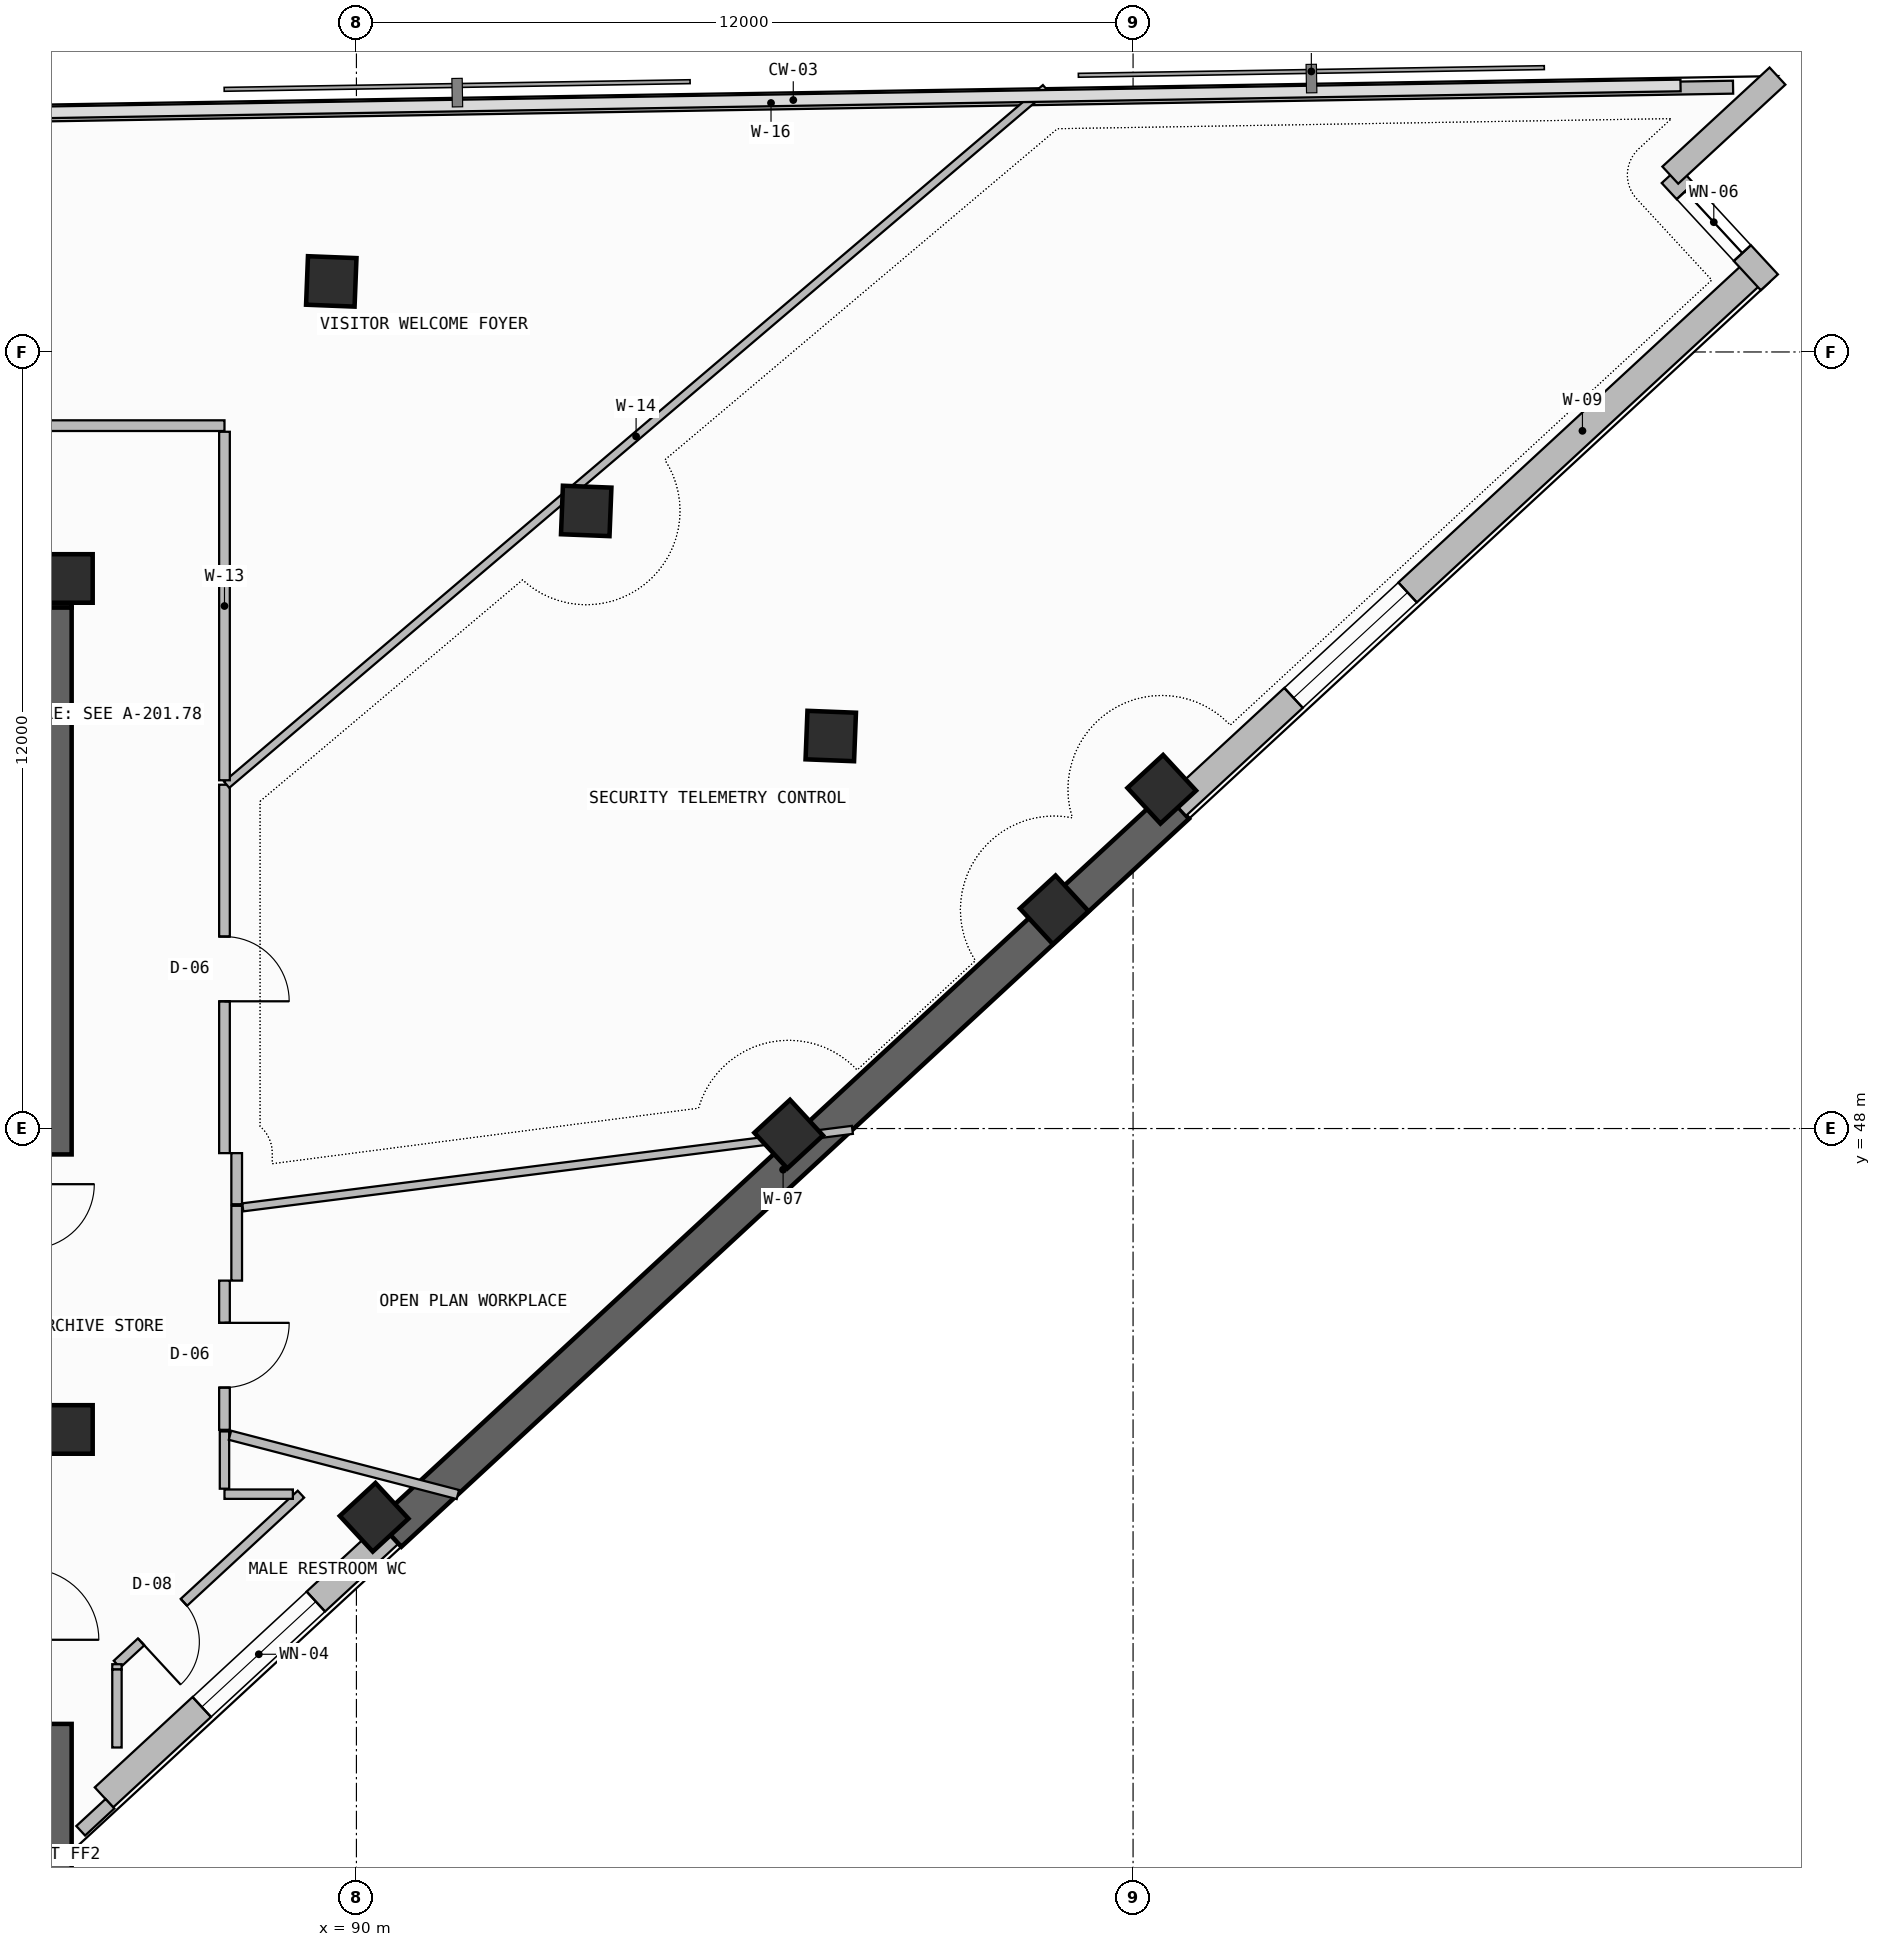
"""IFC4 building model, lengths in metres.
Left out: names, types, materials, properties, quantities, classifications, styles, units other than length and angle.
Written with IfcOpenShell. Run it as: python <this file> out.ifc"""

import sys

from ifc_helpers import new_model, si_unit, direction, frame, frame_2d, origin, origin_2d, place, context, subcontext, project, spatial, rectangle, extrude, element, fill, save


model = new_model("IFC4")
c1 = context("Model", 3, precision=1e-05, world=origin(), true_north=direction((0.0, 1.0)))
c2 = subcontext(c1, "Body", "Model", "MODEL_VIEW")
j1 = project(units=[si_unit("LENGTHUNIT", "METRE"), si_unit("PLANEANGLEUNIT", "RADIAN")], contexts=[c1])
p1 = place(None, origin())
s1 = spatial("IfcSite", under=j1, at=p1, CompositionType="ELEMENT")
p2 = place(p1, origin())
s2 = spatial("IfcBuilding", under=s1, at=p2, CompositionType="ELEMENT")
p3 = place(p2, frame((0.0, 0.0, 278.34)))
s3 = spatial("IfcBuildingStorey", under=s2, at=p3, CompositionType="ELEMENT", Elevation=278.34)
p4 = place(p3, frame((85.3, 35.5, -0.26), z_axis=(0.0, 0.0, 1.0), x_axis=(0.0, 1.0, 0.0)))
e1 = element("IfcWall", 1, at=p4, inside=s3, PredefinedType="SHEAR", context=c2, shape_type="SweptSolid", body=[
    extrude(rectangle(XDim=3.3, YDim=0.6, at=frame_2d((1.65, 0.0))), origin(), (0.0, 0.0, 1.0), 3.52),
])
p5 = place(p3, frame((72.0, 56.35, -0.26), z_axis=(0.0, 0.0, 1.0), x_axis=(1.0, 0.0, 0.0)))
e2 = element("IfcWall", 2, at=p5, inside=s3, PredefinedType="SHEAR", context=c2, shape_type="SweptSolid", body=[
    extrude(rectangle(XDim=13.6, YDim=0.6, at=frame_2d((6.8, 0.0))), origin(), (0.0, 0.0, 1.0), 3.52),
])
p6 = place(p3, frame((85.3, 47.6, -0.26), z_axis=(0.0, 0.0, 1.0), x_axis=(0.0, 1.0, 0.0)))
e3 = element("IfcWall", 3, at=p6, inside=s3, PredefinedType="SHEAR", context=c2, shape_type="SweptSolid", body=[
    extrude(rectangle(XDim=8.45, YDim=0.6, at=frame_2d((4.225, 0.0))), origin(), (0.0, 0.0, 1.0), 3.52),
])
for number, where, z_axis, x_axis in (
    (4, (85.55, 43.35, 0.0), (0.0, 0.0, 1.0), (1.0, 0.0, 0.0)),
    (5, (85.55, 56.5, 0.0), (0.0, 0.0, 1.0), (1.0, 0.0, 0.0)),
    (6, (90.273, 41.993, 0.0), (0.0, 0.0, 1.0), (0.734, 0.679, 0.0)),
    (7, (96.679, 47.914, 0.0), (0.0, 0.0, 1.0), (0.734, 0.679, 0.0)),
    (8, (102.443, 53.242, 0.0), (0.0, 0.0, 1.0), (0.734, 0.679, 0.0)),
    (9, (100.782, 51.38, 0.0), (0.0, 0.0, 1.0), (0.734, 0.679, 0.0)),
    (10, (97.329, 54.065, 0.0), (0.0, 0.0, 1.0), (0.039, 0.999, 0.0)),
    (11, (93.55, 57.544, 0.0), (0.0, 0.0, 1.0), (0.039, 0.999, 0.0)),
    (12, (89.611, 61.09, 0.0), (0.0, 0.0, 1.0), (0.039, 0.999, 0.0)),
):
    element("IfcColumn", number, at=place(p3, frame(where, z_axis=z_axis, x_axis=x_axis)), inside=s3, PredefinedType="COLUMN", context=c2, shape_type="SweptSolid", body=[
        extrude(rectangle(XDim=0.75, YDim=0.75, at=origin_2d()), origin(), (0.0, 0.0, 1.0), 3.52),
    ])
p7 = place(p3, frame((86.1, 37.665, 0.0), z_axis=(0.0, 0.0, 1.0), x_axis=(0.734321413343, 0.678801931277, 0.0)))
e13 = element("IfcWall", 13, at=p7, inside=s3, PredefinedType="SOLIDWALL", context=c2, shape_type="SweptSolid", body=[
    extrude(rectangle(XDim=6.002, YDim=0.42, at=frame_2d((3.001, 0.0))), origin(), (0.0, 0.0, 1.0), 2.245),
])
p8 = place(p7, frame((2.057, 0.0, 0.965)))
e14 = element("IfcOpeningElement", 14, at=p8, cuts=e13, PredefinedType="OPENING", context=c2, shape_type="SweptSolid", body=[
    extrude(rectangle(XDim=2.4, YDim=1.2, at=frame_2d((1.2, 0.6))), frame((0.0, 0.22, 0.0), z_axis=(0.0, -1.0, 0.0), x_axis=(1.0, 0.0, 0.0)), (0.0, 0.0, 1.0), 0.44),
])
p9 = place(p3, frame((90.508, 41.74, -0.26), z_axis=(0.0, 0.0, 1.0), x_axis=(0.734315848115, 0.678807951638, 0.0)))
e15 = element("IfcWall", 15, at=p9, inside=s3, PredefinedType="SHEAR", context=c2, shape_type="SweptSolid", body=[
    extrude(rectangle(XDim=16.573, YDim=0.55, at=frame_2d((8.286, 0.0))), origin(), (0.0, 0.0, 1.0), 3.52),
])
p10 = place(p3, frame((102.677, 52.989, 0.0), z_axis=(0.0, 0.0, 1.0), x_axis=(0.734331107219, 0.678791444386, 0.0)))
e16 = element("IfcWall", 16, at=p10, inside=s3, PredefinedType="SOLIDWALL", context=c2, shape_type="SweptSolid", body=[
    extrude(rectangle(XDim=12.211, YDim=0.42, at=frame_2d((6.106, 0.0))), origin(), (0.0, 0.0, 1.0), 2.245),
])
p11 = place(p10, frame((2.454, 0.0, 0.965)))
e17 = element("IfcOpeningElement", 17, at=p11, cuts=e16, PredefinedType="OPENING", context=c2, shape_type="SweptSolid", body=[
    extrude(rectangle(XDim=2.4, YDim=1.2, at=frame_2d((1.2, 0.6))), frame((0.0, 0.22, 0.0), z_axis=(0.0, -1.0, 0.0), x_axis=(1.0, 0.0, 0.0)), (0.0, 0.0, 1.0), 0.44),
])
p12 = place(p3, frame((111.832, 61.076, 0.0), z_axis=(0.0, 0.0, 1.0), x_axis=(-0.678792531533, 0.734330102294, 0.0)))
e18 = element("IfcWall", 18, at=p12, inside=s3, PredefinedType="SOLIDWALL", context=c2, shape_type="SweptSolid", body=[
    extrude(rectangle(XDim=2.255, YDim=0.36, at=frame_2d((1.127, 0.0))), origin(), (0.0, 0.0, 1.0), 3.26),
])
p13 = place(p12, frame((0.615, 0.0, 0.45)))
e19 = element("IfcOpeningElement", 19, at=p13, cuts=e18, PredefinedType="OPENING", context=c2, shape_type="SweptSolid", body=[
    extrude(rectangle(XDim=1.3, YDim=2.4, at=frame_2d((0.65, 1.2))), frame((0.0, 0.19, 0.0), z_axis=(0.0, -1.0, 0.0), x_axis=(1.0, 0.0, 0.0)), (0.0, 0.0, 1.0), 0.38),
])
p14 = place(p3, frame((110.301, 62.732, 0.0), z_axis=(0.0, 0.0, 1.0), x_axis=(0.734330102294, 0.678792531533, 0.0)))
e20 = element("IfcWall", 20, at=p14, inside=s3, PredefinedType="SOLIDWALL", context=c2, shape_type="SweptSolid", body=[
    extrude(rectangle(XDim=2.255, YDim=0.36, at=frame_2d((1.127, 0.0))), origin(), (0.0, 0.0, 1.0), 3.26),
])
p15 = place(p3, frame((111.271, 64.092, 0.0), z_axis=(0.0, 0.0, 1.0), x_axis=(-0.999864741935, -0.016446818413, 0.0)))
e21 = element("IfcWall", 21, at=p15, inside=s3, PredefinedType="PARAPET", context=c2, shape_type="SweptSolid", body=[
    extrude(rectangle(XDim=29.733, YDim=0.2, at=frame_2d((14.866, 0.0))), origin(), (0.0, 0.0, 1.0), 1.15),
])
p16 = place(p3, frame((86.192, 37.566, 0.0), z_axis=(0.0, 0.0, 1.0), x_axis=(-0.734346728958, -0.678774544064, 0.0)))
e22 = element("IfcWall", 22, at=p16, inside=s3, PredefinedType="PARAPET", context=c2, shape_type="SweptSolid", body=[
    extrude(rectangle(XDim=0.615, YDim=0.2, at=frame_2d((0.308, 0.0))), origin(), (0.0, 0.0, 1.0), 1.15),
])
p17 = place(p3, frame((86.3, 39.722, 0.0), z_axis=(0.0, 0.0, 1.0), x_axis=(0.734312402088, 0.678811679436, 0.0)))
e23 = element("IfcWall", 23, at=p17, inside=s3, PredefinedType="PARTITIONING", context=c2, shape_type="SweptSolid", body=[
    extrude(rectangle(XDim=3.871, YDim=0.145, at=frame_2d((1.936, 0.0))), origin(), (0.0, 0.0, 1.0), 2.745),
])
p18 = place(p17, frame((0.509, 0.0, 0.0)))
e24 = element("IfcOpeningElement", 24, at=p18, cuts=e23, PredefinedType="OPENING", context=c2, shape_type="SweptSolid", body=[
    extrude(rectangle(XDim=0.9, YDim=2.1, at=frame_2d((0.45, 1.05))), frame((0.0, 0.083, 0.0), z_axis=(0.0, -1.0, 0.0), x_axis=(1.0, 0.0, 0.0)), (0.0, 0.0, 1.0), 0.165),
])
p19 = place(p3, frame((89.018, 42.35, 0.0), z_axis=(0.0, 0.0, 1.0), x_axis=(-1.0, 0.0, 0.0)))
e25 = element("IfcWall", 25, at=p19, inside=s3, PredefinedType="PARTITIONING", context=c2, shape_type="SweptSolid", body=[
    extrude(rectangle(XDim=1.057, YDim=0.145, at=frame_2d((0.528, 0.0))), origin(), (0.0, 0.0, 1.0), 2.745),
])
p20 = place(p3, frame((87.961, 42.435, 0.0), z_axis=(0.0, 0.0, 1.0), x_axis=(0.0, 1.0, 0.0)))
e26 = element("IfcWall", 26, at=p20, inside=s3, PredefinedType="PARTITIONING", context=c2, shape_type="SweptSolid", body=[
    extrude(rectangle(XDim=0.885, YDim=0.145, at=frame_2d((0.442, 0.0))), origin(), (0.0, 0.0, 1.0), 2.745),
])
p21 = place(p3, frame((86.3, 39.641, 0.0), z_axis=(0.0, 0.0, 1.0), x_axis=(0.0, 1.0, 0.0)))
e27 = element("IfcWall", 27, at=p21, inside=s3, PredefinedType="PARTITIONING", context=c2, shape_type="SweptSolid", body=[
    extrude(rectangle(XDim=0.082, YDim=0.145, at=frame_2d((0.041, 0.0))), origin(), (0.0, 0.0, 1.0), 3.26),
])
p22 = place(p3, frame((88.046, 43.26, 0.0), z_axis=(0.0, 0.0, 1.0), x_axis=(0.967793741417, -0.251744461855, 0.0)))
e28 = element("IfcWall", 28, at=p22, inside=s3, PredefinedType="PARTITIONING", context=c2, shape_type="SweptSolid", body=[
    extrude(rectangle(XDim=3.639, YDim=0.145, at=frame_2d((1.819, 0.0))), origin(), (0.0, 0.0, 1.0), 2.245),
])
p23 = place(p3, frame((87.961, 43.344, 0.0), z_axis=(0.0, 0.0, 1.0), x_axis=(0.0, 1.0, 0.0)))
e29 = element("IfcWall", 29, at=p23, inside=s3, PredefinedType="PARTITIONING", context=c2, shape_type="SweptSolid", body=[
    extrude(rectangle(XDim=2.305, YDim=0.165, at=frame_2d((1.153, 0.0))), origin(), (0.0, 0.0, 1.0), 2.745),
])
p24 = place(p23, frame((0.653, 0.0, 0.0)))
e30 = element("IfcOpeningElement", 30, at=p24, cuts=e29, PredefinedType="OPENING", context=c2, shape_type="SweptSolid", body=[
    extrude(rectangle(XDim=1.0, YDim=2.2, at=frame_2d((0.5, 1.1))), frame((0.0, 0.093, 0.0), z_axis=(0.0, -1.0, 0.0), x_axis=(1.0, 0.0, 0.0)), (0.0, 0.0, 1.0), 0.185),
])
p25 = place(p3, frame((88.15, 45.65, 0.0), z_axis=(0.0, 0.0, 1.0), x_axis=(0.0, 1.0, 0.0)))
e31 = element("IfcWall", 31, at=p25, inside=s3, PredefinedType="PARTITIONING", context=c2, shape_type="SweptSolid", body=[
    extrude(rectangle(XDim=1.156, YDim=0.165, at=frame_2d((0.578, 0.0))), origin(), (0.0, 0.0, 1.0), 3.26),
])
p26 = place(p3, frame((88.244, 46.782, 0.0), z_axis=(0.0, 0.0, 1.0), x_axis=(0.992017807515, 0.126097857129, 0.0)))
e32 = element("IfcWall", 32, at=p26, inside=s3, PredefinedType="PARTITIONING", context=c2, shape_type="SweptSolid", body=[
    extrude(rectangle(XDim=9.495, YDim=0.125, at=frame_2d((4.747, 0.0))), origin(), (0.0, 0.0, 1.0), 2.245),
])
p27 = place(p3, frame((87.961, 47.62, 0.0), z_axis=(0.0, 0.0, 1.0), x_axis=(0.0, 1.0, 0.0)))
e33 = element("IfcWall", 33, at=p27, inside=s3, PredefinedType="PARTITIONING", context=c2, shape_type="SweptSolid", body=[
    extrude(rectangle(XDim=5.692, YDim=0.165, at=frame_2d((2.846, 0.0))), origin(), (0.0, 0.0, 1.0), 3.26),
])
p28 = place(p27, frame((2.346, 0.0, 0.0)))
e34 = element("IfcOpeningElement", 34, at=p28, cuts=e33, PredefinedType="OPENING", context=c2, shape_type="SweptSolid", body=[
    extrude(rectangle(XDim=1.0, YDim=2.2, at=frame_2d((0.5, 1.1))), frame((0.0, 0.093, 0.0), z_axis=(0.0, -1.0, 0.0), x_axis=(1.0, 0.0, 0.0)), (0.0, 0.0, 1.0), 0.185),
])
p29 = place(p3, frame((88.15, 46.83, 0.0), z_axis=(0.0, 0.0, 1.0), x_axis=(0.0, 1.0, 0.0)))
e35 = element("IfcWall", 35, at=p29, inside=s3, PredefinedType="PARTITIONING", context=c2, shape_type="SweptSolid", body=[
    extrude(rectangle(XDim=0.79, YDim=0.165, at=frame_2d((0.395, 0.0))), origin(), (0.0, 0.0, 1.0), 3.26),
])
p30 = place(p3, frame((87.995, 53.312, 0.0), z_axis=(0.0, 0.0, 1.0), x_axis=(0.761637538475, 0.648003287018, 0.0)))
e36 = element("IfcWall", 36, at=p30, inside=s3, PredefinedType="PARTITIONING", context=c2, shape_type="SweptSolid", body=[
    extrude(rectangle(XDim=16.612, YDim=0.125, at=frame_2d((8.306, 0.0))), origin(), (0.0, 0.0, 1.0), 2.645),
])
p31 = place(p3, frame((87.961, 58.861, 0.0), z_axis=(0.0, 0.0, 1.0), x_axis=(-1.0, 0.0, 0.0)))
e37 = element("IfcWall", 37, at=p31, inside=s3, PredefinedType="PARTITIONING", context=c2, shape_type="SweptSolid", body=[
    extrude(rectangle(XDim=6.925, YDim=0.165, at=frame_2d((3.462, 0.0))), origin(), (0.0, 0.0, 1.0), 2.745),
])
p32 = place(p31, frame((3.791, 0.0, 0.0)))
e38 = element("IfcOpeningElement", 38, at=p32, cuts=e37, PredefinedType="OPENING", context=c2, shape_type="SweptSolid", body=[
    extrude(rectangle(XDim=1.0, YDim=2.2, at=frame_2d((0.5, 1.1))), frame((0.0, 0.093, 0.0), z_axis=(0.0, -1.0, 0.0), x_axis=(1.0, 0.0, 0.0)), (0.0, 0.0, 1.0), 0.185),
])
p33 = place(p3, frame((87.961, 53.382, 0.0), z_axis=(0.0, 0.0, 1.0), x_axis=(0.0, 1.0, 0.0)))
e39 = element("IfcWall", 39, at=p33, inside=s3, PredefinedType="PARTITIONING", context=c2, shape_type="SweptSolid", body=[
    extrude(rectangle(XDim=5.385, YDim=0.165, at=frame_2d((2.692, 0.0))), origin(), (0.0, 0.0, 1.0), 2.745),
])
p34 = place(p3, frame((86.3, 38.436, 0.0), z_axis=(0.0, 0.0, 1.0), x_axis=(0.0, 1.0, 0.0)))
e40 = element("IfcWall", 40, at=p34, inside=s3, PredefinedType="PARTITIONING", context=c2, shape_type="SweptSolid", body=[
    extrude(rectangle(XDim=1.205, YDim=0.145, at=frame_2d((0.603, 0.0))), origin(), (0.0, 0.0, 1.0), 3.26),
])
p35 = place(p8, origin())
e41 = element("IfcWindow", 41, at=p35, inside=s3, PartitioningType="SINGLE_PANEL", PredefinedType="WINDOW", context=c2, shape_type="SweptSolid", body=[
    extrude(rectangle(XDim=2.4, YDim=1.2, at=frame_2d((1.2, 0.6))), frame((0.0, 0.03, 0.0), z_axis=(0.0, -1.0, 0.0), x_axis=(1.0, 0.0, 0.0)), (0.0, 0.0, 1.0), 0.06),
])
fill(e14, e41)
p36 = place(p11, origin())
e42 = element("IfcWindow", 42, at=p36, inside=s3, PartitioningType="SINGLE_PANEL", PredefinedType="WINDOW", context=c2, shape_type="SweptSolid", body=[
    extrude(rectangle(XDim=2.4, YDim=1.2, at=frame_2d((1.2, 0.6))), frame((0.0, 0.03, 0.0), z_axis=(0.0, -1.0, 0.0), x_axis=(1.0, 0.0, 0.0)), (0.0, 0.0, 1.0), 0.06),
])
fill(e17, e42)
p37 = place(p13, origin())
e43 = element("IfcWindow", 43, at=p37, inside=s3, PartitioningType="SINGLE_PANEL", PredefinedType="WINDOW", context=c2, shape_type="SweptSolid", body=[
    extrude(rectangle(XDim=1.3, YDim=2.4, at=frame_2d((0.65, 1.2))), frame((0.0, 0.03, 0.0), z_axis=(0.0, -1.0, 0.0), x_axis=(1.0, 0.0, 0.0)), (0.0, 0.0, 1.0), 0.06),
])
fill(e19, e43)
p38 = place(p18, frame((0.9, 0.0, 0.0), z_axis=(0.0, 0.0, 1.0), x_axis=(-1.0, 0.0, 0.0)))
e44 = element("IfcDoor", 44, at=p38, inside=s3, OperationType="SINGLE_SWING_RIGHT", PredefinedType="DOOR", context=c2, shape_type="SweptSolid", body=[
    extrude(rectangle(XDim=0.9, YDim=2.1, at=frame_2d((0.45, 1.05))), frame((0.0, 0.025, 0.0), z_axis=(0.0, -1.0, 0.0), x_axis=(1.0, 0.0, 0.0)), (0.0, 0.0, 1.0), 0.05),
])
fill(e24, e44)
p39 = place(p24, frame((1.0, 0.0, 0.0), z_axis=(0.0, 0.0, 1.0), x_axis=(-1.0, 0.0, 0.0)))
e45 = element("IfcDoor", 45, at=p39, inside=s3, OperationType="SINGLE_SWING_LEFT", PredefinedType="DOOR", context=c2, shape_type="SweptSolid", body=[
    extrude(rectangle(XDim=1.0, YDim=2.2, at=frame_2d((0.5, 1.1))), frame((0.0, 0.025, 0.0), z_axis=(0.0, -1.0, 0.0), x_axis=(1.0, 0.0, 0.0)), (0.0, 0.0, 1.0), 0.05),
])
fill(e30, e45)
p40 = place(p28, frame((1.0, 0.0, 0.0), z_axis=(0.0, 0.0, 1.0), x_axis=(-1.0, 0.0, 0.0)))
e46 = element("IfcDoor", 46, at=p40, inside=s3, OperationType="SINGLE_SWING_RIGHT", PredefinedType="DOOR", context=c2, shape_type="SweptSolid", body=[
    extrude(rectangle(XDim=1.0, YDim=2.2, at=frame_2d((0.5, 1.1))), frame((0.0, 0.025, 0.0), z_axis=(0.0, -1.0, 0.0), x_axis=(1.0, 0.0, 0.0)), (0.0, 0.0, 1.0), 0.05),
])
fill(e34, e46)
save(model, sys.argv[1])
